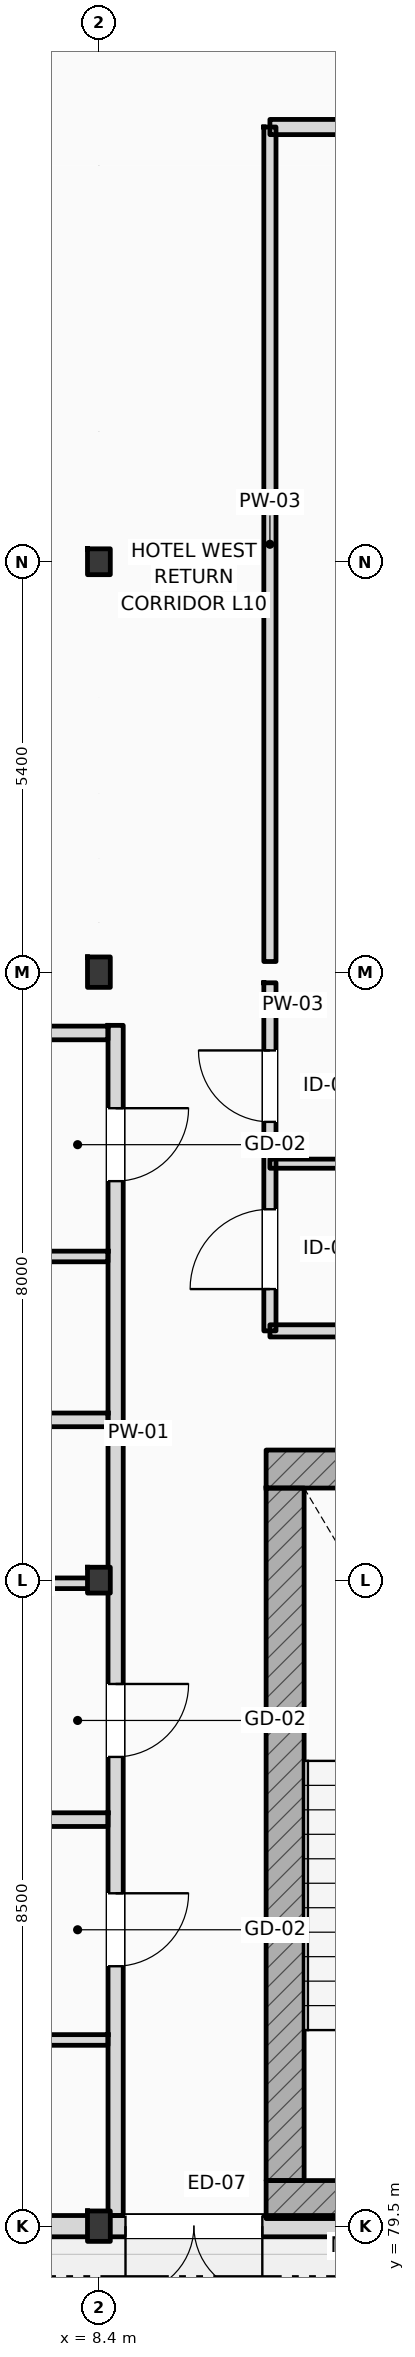
"""IFC4 building model, lengths in metres.
Left out: names, types, materials, properties, quantities, classifications, styles, units other than length and angle.
Written with IfcOpenShell. Run it as: python <this file> out.ifc"""

import sys

from ifc_helpers import new_model, si_unit, direction, frame, frame_2d, origin, origin_2d, place, context, subcontext, project, spatial, rectangle, i_section, extrude, element, fill, save


model = new_model("IFC4")
c1 = context("Model", 3, precision=1e-05, world=origin(), true_north=direction((0.0, 1.0)))
c2 = subcontext(c1, "Body", "Model", "MODEL_VIEW")
j1 = project(units=[si_unit("LENGTHUNIT", "METRE"), si_unit("PLANEANGLEUNIT", "RADIAN")], contexts=[c1])
p1 = place(None, origin())
s1 = spatial("IfcSite", under=j1, at=p1, CompositionType="ELEMENT")
p2 = place(p1, origin())
s2 = spatial("IfcBuilding", under=s1, at=p2, CompositionType="ELEMENT")
p3 = place(p2, frame((0.0, 0.0, 42.6)))
s3 = spatial("IfcBuildingStorey", under=s2, at=p3, CompositionType="ELEMENT", Elevation=42.6)
p4 = place(p3, frame((8.4, 79.5, 0.0), z_axis=(0.0, 0.0, 1.0), x_axis=(1.0, 0.0, 0.0)))
e1 = element("IfcColumn", 1, at=p4, inside=s3, PredefinedType="COLUMN", context=c2, shape_type="SweptSolid", body=[
    extrude(i_section(OverallWidth=0.3, OverallDepth=0.4, WebThickness=0.013, FlangeThickness=0.024, FilletRadius=0.027, at=origin_2d()), origin(), (0.0, 0.0, 1.0), 4.2),
])
p5 = place(p3, frame((8.4, 88.0, 0.0), z_axis=(0.0, 0.0, 1.0), x_axis=(1.0, 0.0, 0.0)))
e2 = element("IfcColumn", 2, at=p5, inside=s3, PredefinedType="COLUMN", context=c2, shape_type="SweptSolid", body=[
    extrude(i_section(OverallWidth=0.3, OverallDepth=0.34, WebThickness=0.012, FlangeThickness=0.021, FilletRadius=0.027, at=origin_2d()), origin(), (0.0, 0.0, 1.0), 4.2),
])
p6 = place(p3, frame((8.4, 96.0, 0.0), z_axis=(0.0, 0.0, 1.0), x_axis=(1.0, 0.0, 0.0)))
e3 = element("IfcColumn", 3, at=p6, inside=s3, PredefinedType="COLUMN", context=c2, shape_type="SweptSolid", body=[
    extrude(i_section(OverallWidth=0.3, OverallDepth=0.4, WebThickness=0.013, FlangeThickness=0.024, FilletRadius=0.027, at=origin_2d()), origin(), (0.0, 0.0, 1.0), 4.2),
])
p7 = place(p3, frame((8.4, 101.4, 0.0), z_axis=(0.0, 0.0, 1.0), x_axis=(1.0, 0.0, 0.0)))
e4 = element("IfcColumn", 4, at=p7, inside=s3, PredefinedType="COLUMN", context=c2, shape_type="SweptSolid", body=[
    extrude(i_section(OverallWidth=0.3, OverallDepth=0.34, WebThickness=0.012, FlangeThickness=0.021, FilletRadius=0.027, at=origin_2d()), origin(), (0.0, 0.0, 1.0), 4.2),
])
for number, where, z_axis, x_axis in (
    (5, (10.6, 89.462, 0.0), (0.0, 0.0, 1.0), (1.0, 0.0, 0.0)),
    (6, (10.6, 79.85, 0.0), (0.0, 0.0, 1.0), (1.0, 0.0, 0.0)),
):
    element("IfcWall", number, at=place(p3, frame(where, z_axis=z_axis, x_axis=x_axis)), inside=s3, PredefinedType="SHEAR", context=c2, shape_type="SweptSolid", body=[
        extrude(rectangle(XDim=5.16, YDim=0.5, at=frame_2d((2.58, 0.0))), origin(), (0.0, 0.0, 1.0), 4.2),
    ])
p8 = place(p3, frame((10.85, 80.1, 0.0), z_axis=(0.0, 0.0, 1.0), x_axis=(0.0, 1.0, 0.0)))
e7 = element("IfcWall", 7, at=p8, inside=s3, PredefinedType="SHEAR", context=c2, shape_type="SweptSolid", body=[
    extrude(rectangle(XDim=9.112, YDim=0.5, at=frame_2d((4.556, 0.0))), origin(), (0.0, 0.0, 1.0), 4.2),
])
p9 = place(p3, frame((0.0, 79.5, 0.0), z_axis=(0.0, 0.0, 1.0), x_axis=(1.0, 0.0, 0.0)))
e8 = element("IfcWall", 8, at=p9, inside=s3, PredefinedType="STANDARD", context=c2, shape_type="SweptSolid", body=[
    extrude(rectangle(XDim=25.2, YDim=0.28, at=frame_2d((12.6, 0.0))), origin(), (0.0, 0.0, 1.0), 3.38),
])
p10 = place(p9, frame((8.75, 0.0, 0.0)))
e9 = element("IfcOpeningElement", 9, at=p10, cuts=e8, PredefinedType="OPENING", context=c2, shape_type="SweptSolid", body=[
    extrude(rectangle(XDim=1.8, YDim=2.4, at=frame_2d((0.9, 1.2))), frame((0.0, 0.15, 0.0), z_axis=(0.0, -1.0, 0.0), x_axis=(1.0, 0.0, 0.0)), (0.0, 0.0, 1.0), 0.3),
])
p11 = place(p3, frame((10.65, 107.12, 0.0), z_axis=(0.0, 0.0, 1.0), x_axis=(1.0, 0.0, 0.0)))
e10 = element("IfcWall", 10, at=p11, inside=s3, PredefinedType="PARTITIONING", context=c2, shape_type="SweptSolid", body=[
    extrude(rectangle(XDim=14.8, YDim=0.2, at=frame_2d((7.4, 0.0))), origin(), (0.0, 0.0, 1.0), 3.94),
])
p12 = place(p11, frame((1.95, 0.0, 0.0)))
e11 = element("IfcOpeningElement", 11, at=p12, cuts=e10, PredefinedType="OPENING", context=c2, shape_type="SweptSolid", body=[
    extrude(rectangle(XDim=0.9, YDim=2.1, at=frame_2d((0.45, 1.05))), frame((0.0, 0.11, 0.0), z_axis=(0.0, -1.0, 0.0), x_axis=(1.0, 0.0, 0.0)), (0.0, 0.0, 1.0), 0.22),
])
p13 = place(p11, frame((8.875, 0.0, 0.0)))
e12 = element("IfcOpeningElement", 12, at=p13, cuts=e10, PredefinedType="OPENING", context=c2, shape_type="SweptSolid", body=[
    extrude(rectangle(XDim=1.25, YDim=2.15, at=frame_2d((0.625, 1.075))), frame((0.0, 0.11, 0.0), z_axis=(0.0, -1.0, 0.0), x_axis=(1.0, 0.0, 0.0)), (0.0, 0.0, 1.0), 0.22),
])
p14 = place(p3, frame((8.62, 79.64, 0.0), z_axis=(0.0, 0.0, 1.0), x_axis=(0.0, 1.0, 0.0)))
e13 = element("IfcWall", 13, at=p14, inside=s3, PredefinedType="PARTITIONING", context=c2, shape_type="SweptSolid", body=[
    extrude(rectangle(XDim=15.66, YDim=0.2, at=frame_2d((7.83, 0.0))), origin(), (0.0, 0.0, 1.0), 3.57),
])
p15 = place(p14, frame((3.28, 0.0, 0.0)))
e14 = element("IfcOpeningElement", 14, at=p15, cuts=e13, PredefinedType="OPENING", context=c2, shape_type="SweptSolid", body=[
    extrude(rectangle(XDim=0.96, YDim=2.2, at=frame_2d((0.48, 1.1))), frame((0.0, 0.11, 0.0), z_axis=(0.0, -1.0, 0.0), x_axis=(1.0, 0.0, 0.0)), (0.0, 0.0, 1.0), 0.22),
])
p16 = place(p14, frame((6.034, 0.0, 0.0)))
e15 = element("IfcOpeningElement", 15, at=p16, cuts=e13, PredefinedType="OPENING", context=c2, shape_type="SweptSolid", body=[
    extrude(rectangle(XDim=0.96, YDim=2.2, at=frame_2d((0.48, 1.1))), frame((0.0, 0.11, 0.0), z_axis=(0.0, -1.0, 0.0), x_axis=(1.0, 0.0, 0.0)), (0.0, 0.0, 1.0), 0.22),
])
p17 = place(p14, frame((13.61, 0.0, 0.0)))
e16 = element("IfcOpeningElement", 16, at=p17, cuts=e13, PredefinedType="OPENING", context=c2, shape_type="SweptSolid", body=[
    extrude(rectangle(XDim=0.96, YDim=2.2, at=frame_2d((0.48, 1.1))), frame((0.0, 0.11, 0.0), z_axis=(0.0, -1.0, 0.0), x_axis=(1.0, 0.0, 0.0)), (0.0, 0.0, 1.0), 0.22),
])
p18 = place(p3, frame((10.65, 91.28, 0.0), z_axis=(0.0, 0.0, 1.0), x_axis=(0.0, 1.0, 0.0)))
e17 = element("IfcWall", 17, at=p18, inside=s3, PredefinedType="PARTITIONING", context=c2, shape_type="SweptSolid", body=[
    extrude(rectangle(XDim=4.58, YDim=0.16, at=frame_2d((2.29, 0.0))), origin(), (0.0, 0.0, 1.0), 3.94),
])
p19 = place(p18, frame((0.55, 0.0, 0.0)))
e18 = element("IfcOpeningElement", 18, at=p19, cuts=e17, PredefinedType="OPENING", context=c2, shape_type="SweptSolid", body=[
    extrude(rectangle(XDim=1.05, YDim=2.12, at=frame_2d((0.525, 1.06))), frame((0.0, 0.09, 0.0), z_axis=(0.0, -1.0, 0.0), x_axis=(1.0, 0.0, 0.0)), (0.0, 0.0, 1.0), 0.18),
])
p20 = place(p18, frame((2.75, 0.0, 0.0)))
e19 = element("IfcOpeningElement", 19, at=p20, cuts=e17, PredefinedType="OPENING", context=c2, shape_type="SweptSolid", body=[
    extrude(rectangle(XDim=0.94, YDim=2.15, at=frame_2d((0.47, 1.075))), frame((0.0, 0.09, 0.0), z_axis=(0.0, -1.0, 0.0), x_axis=(1.0, 0.0, 0.0)), (0.0, 0.0, 1.0), 0.18),
])
p21 = place(p3, frame((0.15, 84.849, 0.0), z_axis=(0.0, 0.0, 1.0), x_axis=(1.0, 0.0, 0.0)))
e20 = element("IfcWall", 20, at=p21, inside=s3, PredefinedType="PARTITIONING", context=c2, shape_type="SweptSolid", body=[
    extrude(rectangle(XDim=8.37, YDim=0.18, at=frame_2d((4.185, 0.0))), origin(), (0.0, 0.0, 1.0), 3.94),
])
p22 = place(p3, frame((5.05, 81.95, 0.0), z_axis=(0.0, 0.0, 1.0), x_axis=(1.0, 0.0, 0.0)))
e21 = element("IfcWall", 21, at=p22, inside=s3, PredefinedType="PARTITIONING", context=c2, shape_type="SweptSolid", body=[
    extrude(rectangle(XDim=3.47, YDim=0.14, at=frame_2d((1.735, 0.0))), origin(), (0.0, 0.0, 1.0), 3.94),
])
p23 = place(p3, frame((0.15, 90.109, 0.0), z_axis=(0.0, 0.0, 1.0), x_axis=(1.0, 0.0, 0.0)))
e22 = element("IfcWall", 22, at=p23, inside=s3, PredefinedType="PARTITIONING", context=c2, shape_type="SweptSolid", body=[
    extrude(rectangle(XDim=8.37, YDim=0.18, at=frame_2d((4.185, 0.0))), origin(), (0.0, 0.0, 1.0), 3.94),
])
p24 = place(p3, frame((5.05, 87.959, 0.0), z_axis=(0.0, 0.0, 1.0), x_axis=(1.0, 0.0, 0.0)))
e23 = element("IfcWall", 23, at=p24, inside=s3, PredefinedType="PARTITIONING", context=c2, shape_type="SweptSolid", body=[
    extrude(rectangle(XDim=3.47, YDim=0.14, at=frame_2d((1.735, 0.0))), origin(), (0.0, 0.0, 1.0), 3.38),
])
p25 = place(p3, frame((0.15, 95.2, 0.0), z_axis=(0.0, 0.0, 1.0), x_axis=(1.0, 0.0, 0.0)))
e24 = element("IfcWall", 24, at=p25, inside=s3, PredefinedType="PARTITIONING", context=c2, shape_type="SweptSolid", body=[
    extrude(rectangle(XDim=8.37, YDim=0.18, at=frame_2d((4.185, 0.0))), origin(), (0.0, 0.0, 1.0), 3.94),
])
p26 = place(p3, frame((5.05, 92.259, 0.0), z_axis=(0.0, 0.0, 1.0), x_axis=(1.0, 0.0, 0.0)))
e25 = element("IfcWall", 25, at=p26, inside=s3, PredefinedType="PARTITIONING", context=c2, shape_type="SweptSolid", body=[
    extrude(rectangle(XDim=3.47, YDim=0.14, at=frame_2d((1.735, 0.0))), origin(), (0.0, 0.0, 1.0), 3.94),
])
p27 = place(p3, frame((10.65, 91.28, 0.0), z_axis=(0.0, 0.0, 1.0), x_axis=(1.0, 0.0, 0.0)))
e26 = element("IfcWall", 26, at=p27, inside=s3, PredefinedType="PARTITIONING", context=c2, shape_type="SweptSolid", body=[
    extrude(rectangle(XDim=6.9, YDim=0.16, at=frame_2d((3.45, 0.0))), origin(), (0.0, 0.0, 1.0), 3.94),
])
p28 = place(p3, frame((10.65, 96.14, 0.0), z_axis=(0.0, 0.0, 1.0), x_axis=(0.0, 1.0, 0.0)))
e27 = element("IfcWall", 27, at=p28, inside=s3, PredefinedType="PARTITIONING", context=c2, shape_type="SweptSolid", body=[
    extrude(rectangle(XDim=10.98, YDim=0.16, at=frame_2d((5.49, 0.0))), origin(), (0.0, 0.0, 1.0), 3.94),
])
p29 = place(p3, frame((10.65, 93.48, 0.0), z_axis=(0.0, 0.0, 1.0), x_axis=(1.0, 0.0, 0.0)))
e28 = element("IfcWall", 28, at=p29, inside=s3, PredefinedType="PARTITIONING", context=c2, shape_type="SweptSolid", body=[
    extrude(rectangle(XDim=6.9, YDim=0.12, at=frame_2d((3.45, 0.0))), origin(), (0.0, 0.0, 1.0), 3.94),
])
p30 = place(p10, frame((1.8, 0.0, 0.0), z_axis=(0.0, 0.0, 1.0), x_axis=(-1.0, 0.0, 0.0)))
e29 = element("IfcDoor", 29, at=p30, inside=s3, OperationType="DOUBLE_SWING_LEFT", PredefinedType="DOOR", context=c2, shape_type="SweptSolid", body=[
    extrude(rectangle(XDim=1.8, YDim=2.4, at=frame_2d((0.9, 1.2))), frame((0.0, 0.025, 0.0), z_axis=(0.0, -1.0, 0.0), x_axis=(1.0, 0.0, 0.0)), (0.0, 0.0, 1.0), 0.05),
])
fill(e9, e29)
p31 = place(p15, frame((0.96, 0.0, 0.0), z_axis=(0.0, 0.0, 1.0), x_axis=(-1.0, 0.0, 0.0)))
e30 = element("IfcDoor", 30, at=p31, inside=s3, OperationType="SINGLE_SWING_RIGHT", PredefinedType="DOOR", context=c2, shape_type="SweptSolid", body=[
    extrude(rectangle(XDim=0.96, YDim=2.2, at=frame_2d((0.48, 1.1))), frame((0.0, 0.025, 0.0), z_axis=(0.0, -1.0, 0.0), x_axis=(1.0, 0.0, 0.0)), (0.0, 0.0, 1.0), 0.05),
])
fill(e14, e30)
p32 = place(p16, frame((0.96, 0.0, 0.0), z_axis=(0.0, 0.0, 1.0), x_axis=(-1.0, 0.0, 0.0)))
e31 = element("IfcDoor", 31, at=p32, inside=s3, OperationType="SINGLE_SWING_RIGHT", PredefinedType="DOOR", context=c2, shape_type="SweptSolid", body=[
    extrude(rectangle(XDim=0.96, YDim=2.2, at=frame_2d((0.48, 1.1))), frame((0.0, 0.025, 0.0), z_axis=(0.0, -1.0, 0.0), x_axis=(1.0, 0.0, 0.0)), (0.0, 0.0, 1.0), 0.05),
])
fill(e15, e31)
p33 = place(p17, frame((0.96, 0.0, 0.0), z_axis=(0.0, 0.0, 1.0), x_axis=(-1.0, 0.0, 0.0)))
e32 = element("IfcDoor", 32, at=p33, inside=s3, OperationType="SINGLE_SWING_RIGHT", PredefinedType="DOOR", context=c2, shape_type="SweptSolid", body=[
    extrude(rectangle(XDim=0.96, YDim=2.2, at=frame_2d((0.48, 1.1))), frame((0.0, 0.025, 0.0), z_axis=(0.0, -1.0, 0.0), x_axis=(1.0, 0.0, 0.0)), (0.0, 0.0, 1.0), 0.05),
])
fill(e16, e32)
p34 = place(p19, origin())
e33 = element("IfcDoor", 33, at=p34, inside=s3, OperationType="SINGLE_SWING_LEFT", PredefinedType="DOOR", context=c2, shape_type="SweptSolid", body=[
    extrude(rectangle(XDim=1.05, YDim=2.12, at=frame_2d((0.525, 1.06))), frame((0.0, 0.025, 0.0), z_axis=(0.0, -1.0, 0.0), x_axis=(1.0, 0.0, 0.0)), (0.0, 0.0, 1.0), 0.05),
])
fill(e18, e33)
p35 = place(p20, origin())
e34 = element("IfcDoor", 34, at=p35, inside=s3, OperationType="SINGLE_SWING_RIGHT", PredefinedType="DOOR", context=c2, shape_type="SweptSolid", body=[
    extrude(rectangle(XDim=0.94, YDim=2.15, at=frame_2d((0.47, 1.075))), frame((0.0, 0.025, 0.0), z_axis=(0.0, -1.0, 0.0), x_axis=(1.0, 0.0, 0.0)), (0.0, 0.0, 1.0), 0.05),
])
fill(e19, e34)
save(model, sys.argv[1])
